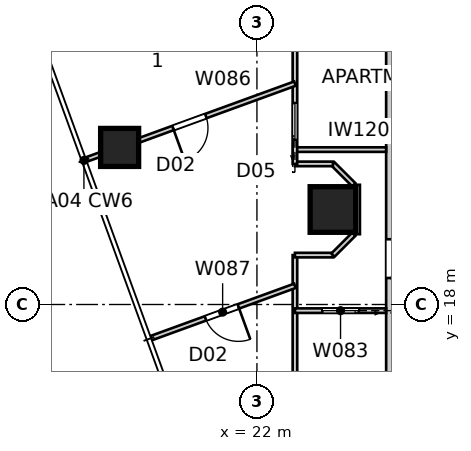
"""IFC4 building model, lengths in metres.
Left out: names, types, materials, properties, quantities, classifications, styles, units other than length and angle.
Written with IfcOpenShell. Run it as: python <this file> out.ifc"""

import sys

from ifc_helpers import new_model, si_unit, direction, frame, frame_2d, origin, origin_2d, place, context, subcontext, project, spatial, rectangle, extrude, element, fill, save


model = new_model("IFC4")
c1 = context("Model", 3, precision=1e-05, world=origin(), true_north=direction((0.0, 1.0)))
c2 = subcontext(c1, "Body", "Model", "MODEL_VIEW")
j1 = project(units=[si_unit("LENGTHUNIT", "METRE"), si_unit("PLANEANGLEUNIT", "RADIAN")], contexts=[c1])
p1 = place(None, origin())
s1 = spatial("IfcSite", under=j1, at=p1, CompositionType="ELEMENT")
p2 = place(p1, origin())
s2 = spatial("IfcBuilding", under=s1, at=p2, CompositionType="ELEMENT")
p3 = place(p2, frame((0.0, 0.0, 154.0)))
s3 = spatial("IfcBuildingStorey", under=s2, at=p3, CompositionType="ELEMENT", Elevation=154.0)
p4 = place(p3, frame((18.387, 22.134, 0.0), z_axis=(0.0, 0.0, 1.0), x_axis=(1.0, 0.0, 0.0)))
e1 = element("IfcColumn", 1, at=p4, inside=s3, PredefinedType="COLUMN", context=c2, shape_type="SweptSolid", body=[
    extrude(rectangle(XDim=1.0, YDim=1.0, at=origin_2d()), origin(), (0.0, 0.0, 1.0), 3.4),
])
p5 = place(p3, frame((24.0, 20.5, 0.0), z_axis=(0.0, 0.0, 1.0), x_axis=(1.0, 0.0, 0.0)))
e2 = element("IfcColumn", 2, at=p5, inside=s3, PredefinedType="COLUMN", context=c2, shape_type="SweptSolid", body=[
    extrude(rectangle(XDim=1.2, YDim=1.2, at=origin_2d()), origin(), (0.0, 0.0, 1.0), 3.4),
])
p6 = place(p3, frame((25.5, 47.1, 0.0), z_axis=(0.0, 0.0, 1.0), x_axis=(0.0, -1.0, 0.0)))
e3 = element("IfcWall", 3, at=p6, inside=s3, PredefinedType="PARTITIONING", context=c2, shape_type="SweptSolid", body=[
    extrude(rectangle(XDim=33.4, YDim=0.2, at=frame_2d((16.7, 0.0))), origin(), (0.0, 0.0, 1.0), 3.25),
])
p7 = place(p6, frame((2.52, 0.0, 0.0)))
e4 = element("IfcOpeningElement", 4, at=p7, cuts=e3, PredefinedType="OPENING", context=c2, shape_type="SweptSolid", body=[
    extrude(rectangle(XDim=1.02, YDim=2.34, at=frame_2d((0.51, 1.17))), frame((0.0, 0.11, 0.0), z_axis=(0.0, -1.0, 0.0), x_axis=(1.0, 0.0, 0.0)), (0.0, 0.0, 1.0), 0.22),
])
p8 = place(p6, frame((27.383, 0.0, 0.0)))
e5 = element("IfcOpeningElement", 5, at=p8, cuts=e3, PredefinedType="OPENING", context=c2, shape_type="SweptSolid", body=[
    extrude(rectangle(XDim=1.02, YDim=2.1, at=frame_2d((0.51, 1.05))), frame((0.0, 0.11, 0.0), z_axis=(0.0, -1.0, 0.0), x_axis=(1.0, 0.0, 0.0)), (0.0, 0.0, 1.0), 0.22),
])
p9 = place(p3, frame((23.0, 22.076, 0.0), z_axis=(0.0, 0.0, 1.0), x_axis=(1.0, 0.0, 0.0)))
e6 = element("IfcWall", 6, at=p9, inside=s3, PredefinedType="PARTITIONING", context=c2, shape_type="SweptSolid", body=[
    extrude(rectangle(XDim=2.4, YDim=0.12, at=frame_2d((1.2, 0.0))), origin(), (0.0, 0.0, 1.0), 3.25),
])
p10 = place(p3, frame((23.0, 11.2, 0.0), z_axis=(0.0, 0.0, 1.0), x_axis=(0.0, 1.0, 0.0)))
e7 = element("IfcWall", 7, at=p10, inside=s3, PredefinedType="PARTITIONING", context=c2, shape_type="SweptSolid", body=[
    extrude(rectangle(XDim=8.1, YDim=0.12, at=frame_2d((4.05, 0.0))), origin(), (0.0, 0.0, 1.0), 3.25),
])
p11 = place(p10, frame((3.849, 0.0, 0.0)))
e8 = element("IfcOpeningElement", 8, at=p11, cuts=e7, PredefinedType="OPENING", context=c2, shape_type="SweptSolid", body=[
    extrude(rectangle(XDim=0.96, YDim=2.1, at=frame_2d((0.48, 1.05))), frame((0.0, 0.07, 0.0), z_axis=(0.0, -1.0, 0.0), x_axis=(1.0, 0.0, 0.0)), (0.0, 0.0, 1.0), 0.14),
])
p12 = place(p3, frame((23.0, 19.3, 0.0), z_axis=(0.0, 0.0, 1.0), x_axis=(1.0, 0.0, 0.0)))
e9 = element("IfcWall", 9, at=p12, inside=s3, PredefinedType="PARTITIONING", context=c2, shape_type="SweptSolid", body=[
    extrude(rectangle(XDim=1.0, YDim=0.12, at=frame_2d((0.5, 0.0))), origin(), (0.0, 0.0, 1.0), 3.25),
])
p13 = place(p3, frame((24.0, 19.3, 0.0), z_axis=(0.0, 0.0, 1.0), x_axis=(0.707106781187, 0.707106781187, 0.0)))
e10 = element("IfcWall", 10, at=p13, inside=s3, PredefinedType="PARTITIONING", context=c2, shape_type="SweptSolid", body=[
    extrude(rectangle(XDim=0.778, YDim=0.12, at=frame_2d((0.389, 0.0))), origin(), (0.0, 0.0, 1.0), 3.25),
])
p14 = place(p3, frame((24.65, 19.85, 0.0), z_axis=(0.0, 0.0, 1.0), x_axis=(0.0, 1.0, 0.0)))
e11 = element("IfcWall", 11, at=p14, inside=s3, PredefinedType="PARTITIONING", context=c2, shape_type="SweptSolid", body=[
    extrude(rectangle(XDim=1.3, YDim=0.12, at=frame_2d((0.65, 0.0))), origin(), (0.0, 0.0, 1.0), 3.25),
])
p15 = place(p3, frame((24.55, 21.15, 0.0), z_axis=(0.0, 0.0, 1.0), x_axis=(-0.707106781187, 0.707106781187, 0.0)))
e12 = element("IfcWall", 12, at=p15, inside=s3, PredefinedType="PARTITIONING", context=c2, shape_type="SweptSolid", body=[
    extrude(rectangle(XDim=0.778, YDim=0.12, at=frame_2d((0.389, 0.0))), origin(), (0.0, 0.0, 1.0), 3.25),
])
p16 = place(p3, frame((24.0, 21.7, 0.0), z_axis=(0.0, 0.0, 1.0), x_axis=(-1.0, 0.0, 0.0)))
e13 = element("IfcWall", 13, at=p16, inside=s3, PredefinedType="PARTITIONING", context=c2, shape_type="SweptSolid", body=[
    extrude(rectangle(XDim=1.0, YDim=0.12, at=frame_2d((0.5, 0.0))), origin(), (0.0, 0.0, 1.0), 3.25),
])
p17 = place(p3, frame((23.0, 21.7, 0.0), z_axis=(0.0, 0.0, 1.0), x_axis=(0.0, 1.0, 0.0)))
e14 = element("IfcWall", 14, at=p17, inside=s3, PredefinedType="PARTITIONING", context=c2, shape_type="SweptSolid", body=[
    extrude(rectangle(XDim=19.512, YDim=0.12, at=frame_2d((9.756, 0.0))), origin(), (0.0, 0.0, 1.0), 2.55),
])
p18 = place(p17, frame((14.961, 0.0, 0.0)))
e15 = element("IfcOpeningElement", 15, at=p18, cuts=e14, PredefinedType="OPENING", context=c2, shape_type="SweptSolid", body=[
    extrude(rectangle(XDim=0.96, YDim=2.1, at=frame_2d((0.48, 1.05))), frame((0.0, 0.07, 0.0), z_axis=(0.0, -1.0, 0.0), x_axis=(1.0, 0.0, 0.0)), (0.0, 0.0, 1.0), 0.14),
])
p19 = place(p17, frame((0.641, 0.0, 0.0)))
e16 = element("IfcOpeningElement", 16, at=p19, cuts=e14, PredefinedType="OPENING", context=c2, shape_type="SweptSolid", body=[
    extrude(rectangle(XDim=0.96, YDim=2.1, at=frame_2d((0.48, 1.05))), frame((0.0, 0.07, 0.0), z_axis=(0.0, -1.0, 0.0), x_axis=(1.0, 0.0, 0.0)), (0.0, 0.0, 1.0), 0.14),
])
p20 = place(p17, frame((9.587, 0.0, 0.0)))
e17 = element("IfcOpeningElement", 17, at=p20, cuts=e14, PredefinedType="OPENING", context=c2, shape_type="SweptSolid", body=[
    extrude(rectangle(XDim=0.96, YDim=2.1, at=frame_2d((0.48, 1.05))), frame((0.0, 0.07, 0.0), z_axis=(0.0, -1.0, 0.0), x_axis=(1.0, 0.0, 0.0)), (0.0, 0.0, 1.0), 0.14),
])
p21 = place(p3, frame((25.4, 17.838, 0.0), z_axis=(0.0, 0.0, 1.0), x_axis=(-1.0, 0.0, 0.0)))
e18 = element("IfcWall", 18, at=p21, inside=s3, PredefinedType="PARTITIONING", context=c2, shape_type="SweptSolid", body=[
    extrude(rectangle(XDim=2.4, YDim=0.12, at=frame_2d((1.2, 0.0))), origin(), (0.0, 0.0, 1.0), 3.25),
])
p22 = place(p21, frame((0.72, 0.0, 0.0)))
e19 = element("IfcOpeningElement", 19, at=p22, cuts=e18, PredefinedType="OPENING", context=c2, shape_type="SweptSolid", body=[
    extrude(rectangle(XDim=0.96, YDim=2.1, at=frame_2d((0.48, 1.05))), frame((0.0, 0.07, 0.0), z_axis=(0.0, -1.0, 0.0), x_axis=(1.0, 0.0, 0.0)), (0.0, 0.0, 1.0), 0.14),
])
p23 = place(p3, frame((23.0, 23.812, 0.0), z_axis=(0.0, 0.0, 1.0), x_axis=(-0.939693791822, -0.342016925912, 0.0)))
e20 = element("IfcWall", 20, at=p23, inside=s3, PredefinedType="PARTITIONING", context=c2, shape_type="SweptSolid", body=[
    extrude(rectangle(XDim=5.869, YDim=0.12, at=frame_2d((2.935, 0.0))), origin(), (0.0, 0.0, 1.0), 3.25),
])
p24 = place(p23, frame((2.494, 0.0, 0.0)))
e21 = element("IfcOpeningElement", 21, at=p24, cuts=e20, PredefinedType="OPENING", context=c2, shape_type="SweptSolid", body=[
    extrude(rectangle(XDim=0.92, YDim=2.34, at=frame_2d((0.46, 1.17))), frame((0.0, 0.07, 0.0), z_axis=(0.0, -1.0, 0.0), x_axis=(1.0, 0.0, 0.0)), (0.0, 0.0, 1.0), 0.14),
])
p25 = place(p3, frame((23.0, 18.492, 0.0), z_axis=(0.0, 0.0, 1.0), x_axis=(-0.939682468191, -0.342048036063, 0.0)))
e22 = element("IfcWall", 22, at=p25, inside=s3, PredefinedType="PARTITIONING", context=c2, shape_type="SweptSolid", body=[
    extrude(rectangle(XDim=4.049, YDim=0.12, at=frame_2d((2.024, 0.0))), origin(), (0.0, 0.0, 1.0), 3.25),
])
p26 = place(p25, frame((1.584, 0.0, 0.0)))
e23 = element("IfcOpeningElement", 23, at=p26, cuts=e22, PredefinedType="OPENING", context=c2, shape_type="SweptSolid", body=[
    extrude(rectangle(XDim=0.92, YDim=2.34, at=frame_2d((0.46, 1.17))), frame((0.0, 0.07, 0.0), z_axis=(0.0, -1.0, 0.0), x_axis=(1.0, 0.0, 0.0)), (0.0, 0.0, 1.0), 0.14),
])
p27 = place(p8, origin())
e24 = element("IfcDoor", 24, at=p27, inside=s3, OperationType="SINGLE_SWING_RIGHT", PredefinedType="DOOR", context=c2, shape_type="SweptSolid", body=[
    extrude(rectangle(XDim=1.02, YDim=2.1, at=frame_2d((0.51, 1.05))), frame((0.0, 0.025, 0.0), z_axis=(0.0, -1.0, 0.0), x_axis=(1.0, 0.0, 0.0)), (0.0, 0.0, 1.0), 0.05),
])
fill(e5, e24)
p28 = place(p22, origin())
e25 = element("IfcDoor", 25, at=p28, inside=s3, OperationType="SLIDING_TO_LEFT", PredefinedType="DOOR", context=c2, shape_type="SweptSolid", body=[
    extrude(rectangle(XDim=0.96, YDim=2.1, at=frame_2d((0.48, 1.05))), frame((0.0, 0.025, 0.0), z_axis=(0.0, -1.0, 0.0), x_axis=(1.0, 0.0, 0.0)), (0.0, 0.0, 1.0), 0.05),
])
fill(e19, e25)
p29 = place(p26, origin())
e26 = element("IfcDoor", 26, at=p29, inside=s3, OperationType="SINGLE_SWING_LEFT", PredefinedType="DOOR", context=c2, shape_type="SweptSolid", body=[
    extrude(rectangle(XDim=0.92, YDim=2.34, at=frame_2d((0.46, 1.17))), frame((0.0, 0.025, 0.0), z_axis=(0.0, -1.0, 0.0), x_axis=(1.0, 0.0, 0.0)), (0.0, 0.0, 1.0), 0.05),
])
fill(e23, e26)
p30 = place(p24, origin())
e27 = element("IfcDoor", 27, at=p30, inside=s3, OperationType="SINGLE_SWING_RIGHT", PredefinedType="DOOR", context=c2, shape_type="SweptSolid", body=[
    extrude(rectangle(XDim=0.92, YDim=2.34, at=frame_2d((0.46, 1.17))), frame((0.0, 0.025, 0.0), z_axis=(0.0, -1.0, 0.0), x_axis=(1.0, 0.0, 0.0)), (0.0, 0.0, 1.0), 0.05),
])
fill(e21, e27)
p31 = place(p19, origin())
e28 = element("IfcDoor", 28, at=p31, inside=s3, OperationType="SLIDING_TO_LEFT", PredefinedType="DOOR", context=c2, shape_type="SweptSolid", body=[
    extrude(rectangle(XDim=0.96, YDim=2.1, at=frame_2d((0.48, 1.05))), frame((0.0, 0.025, 0.0), z_axis=(0.0, -1.0, 0.0), x_axis=(1.0, 0.0, 0.0)), (0.0, 0.0, 1.0), 0.05),
])
fill(e16, e28)
save(model, sys.argv[1])
